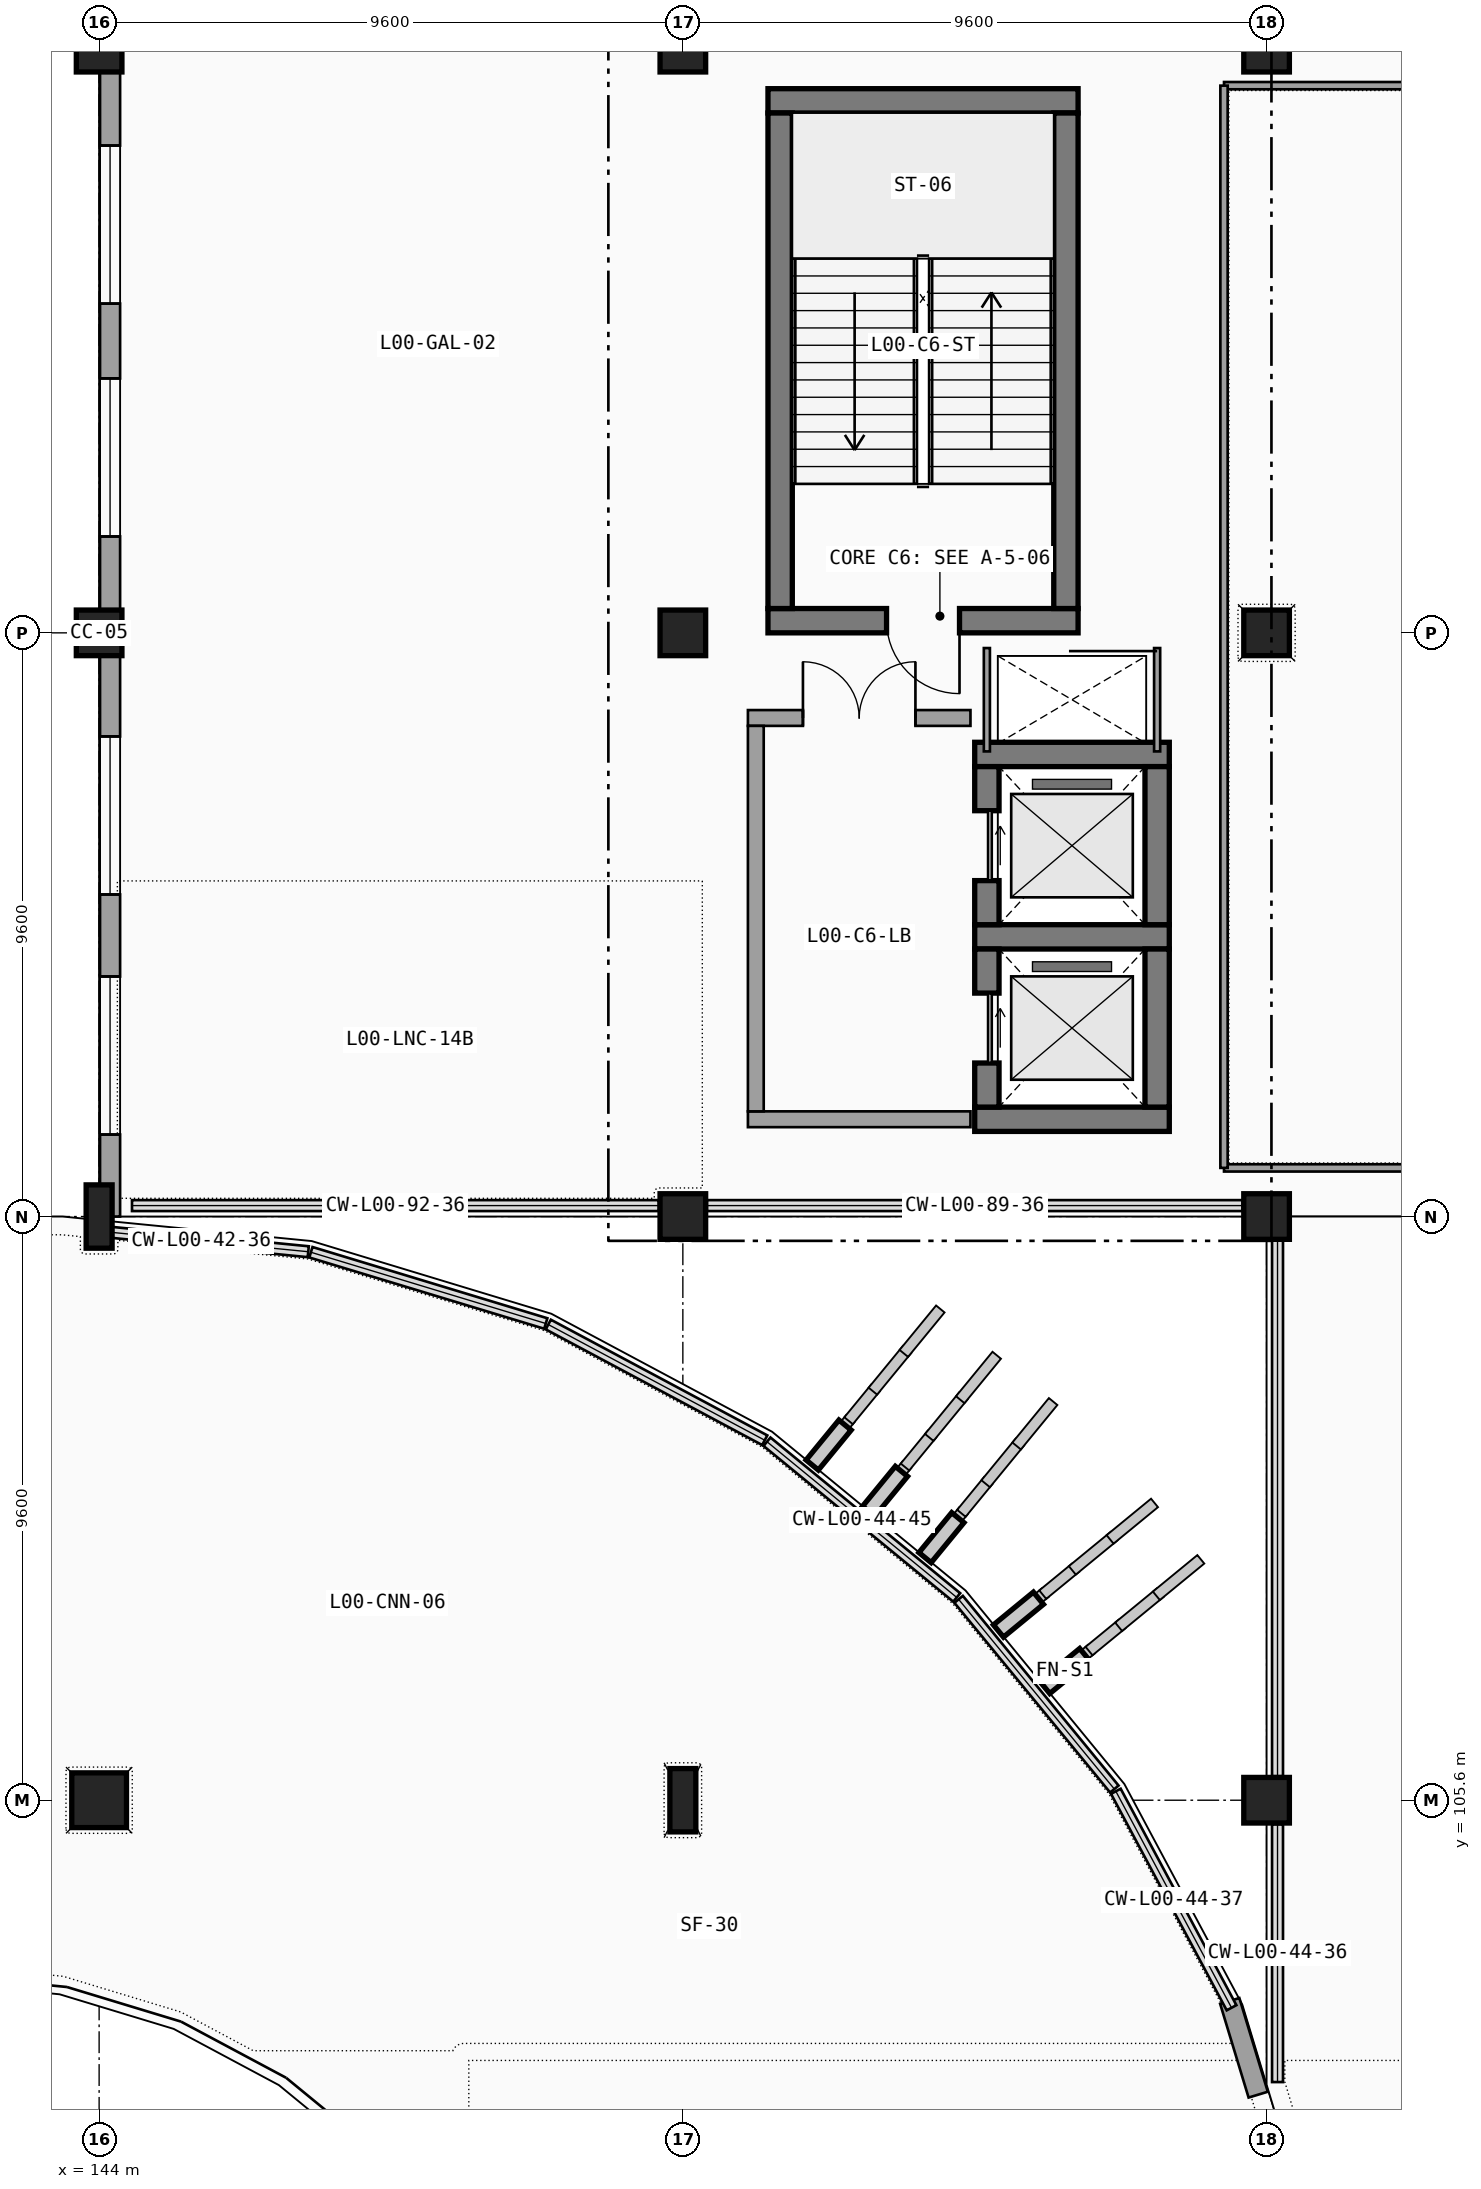
"""IFC4 building model, lengths in metres.
Left out: names, types, materials, properties, quantities, classifications, styles, units other than length and angle.
Written with IfcOpenShell. Run it as: python <this file> out.ifc"""

import sys

from ifc_helpers import new_model, si_unit, direction, frame, frame_2d, origin, origin_2d, place, context, subcontext, project, spatial, rectangle, i_section, extrude, element, fill, save


model = new_model("IFC4")
c1 = context("Model", 3, precision=1e-05, world=origin(), true_north=direction((0.0, 1.0)))
c2 = subcontext(c1, "Body", "Model", "MODEL_VIEW")
j1 = project(units=[si_unit("LENGTHUNIT", "METRE"), si_unit("PLANEANGLEUNIT", "RADIAN")], contexts=[c1])
p1 = place(None, origin())
s1 = spatial("IfcSite", under=j1, at=p1, CompositionType="ELEMENT")
p2 = place(p1, origin())
s2 = spatial("IfcBuilding", under=s1, at=p2, CompositionType="ELEMENT")
p3 = place(p2, origin())
s3 = spatial("IfcBuildingStorey", under=s2, at=p3, CompositionType="ELEMENT", Elevation=0.0)
p4 = place(p3, frame((144.0, 105.6, 0.0), z_axis=(0.0, 0.0, 1.0), x_axis=(1.0, 0.0, 0.0)))
e1 = element("IfcColumn", 1, at=p4, inside=s3, PredefinedType="COLUMN", context=c2, shape_type="SweptSolid", body=[
    extrude(rectangle(XDim=0.9, YDim=0.9, at=origin_2d()), origin(), (0.0, 0.0, 1.0), 4.8),
])
p5 = place(p3, frame((144.0, 115.2, 0.0), z_axis=(0.0, 0.0, 1.0), x_axis=(1.0, 0.0, 0.0)))
e2 = element("IfcColumn", 2, at=p5, inside=s3, PredefinedType="COLUMN", context=c2, shape_type="SweptSolid", body=[
    extrude(i_section(OverallWidth=0.427, OverallDepth=1.042, WebThickness=0.031, FlangeThickness=0.056, FilletRadius=0.031, at=origin_2d()), origin(), (0.0, 0.0, 1.0), 4.8),
])
for number, where, z_axis, x_axis in (
    (3, (144.0, 124.8, 0.0), (0.0, 0.0, 1.0), (1.0, 0.0, 0.0)),
    (4, (144.0, 134.4, 0.0), (0.0, 0.0, 1.0), (1.0, 0.0, 0.0)),
):
    element("IfcColumn", number, at=place(p3, frame(where, z_axis=z_axis, x_axis=x_axis)), inside=s3, PredefinedType="COLUMN", context=c2, shape_type="SweptSolid", body=[
        extrude(rectangle(XDim=0.75, YDim=0.75, at=origin_2d()), origin(), (0.0, 0.0, 1.0), 4.8),
    ])
p6 = place(p3, frame((153.6, 105.6, 0.0), z_axis=(0.0, 0.0, 1.0), x_axis=(1.0, 0.0, 0.0)))
e5 = element("IfcColumn", 5, at=p6, inside=s3, PredefinedType="COLUMN", context=c2, shape_type="SweptSolid", body=[
    extrude(i_section(OverallWidth=0.427, OverallDepth=1.042, WebThickness=0.031, FlangeThickness=0.056, FilletRadius=0.031, at=origin_2d()), origin(), (0.0, 0.0, 1.0), 4.8),
])
for number, where, z_axis, x_axis in (
    (6, (153.6, 115.2, 0.0), (0.0, 0.0, 1.0), (1.0, 0.0, 0.0)),
    (7, (153.6, 124.8, 0.0), (0.0, 0.0, 1.0), (1.0, 0.0, 0.0)),
    (8, (153.6, 134.4, 0.0), (0.0, 0.0, 1.0), (1.0, 0.0, 0.0)),
    (9, (163.2, 105.6, 0.0), (0.0, 0.0, 1.0), (1.0, 0.0, 0.0)),
    (10, (163.2, 115.2, 0.0), (0.0, 0.0, 1.0), (1.0, 0.0, 0.0)),
    (11, (163.2, 124.8, 0.0), (0.0, 0.0, 1.0), (1.0, 0.0, 0.0)),
    (12, (163.2, 134.4, 0.0), (0.0, 0.0, 1.0), (1.0, 0.0, 0.0)),
):
    element("IfcColumn", number, at=place(p3, frame(where, z_axis=z_axis, x_axis=x_axis)), inside=s3, PredefinedType="COLUMN", context=c2, shape_type="SweptSolid", body=[
        extrude(rectangle(XDim=0.75, YDim=0.75, at=origin_2d()), origin(), (0.0, 0.0, 1.0), 4.8),
    ])
p7 = place(p3, frame((144.18, 134.045, 0.0), z_axis=(0.0, 0.0, 1.0), x_axis=(0.0, -1.0, 0.0)))
e13 = element("IfcWall", 13, at=p7, inside=s3, PredefinedType="SOLIDWALL", context=c2, shape_type="SweptSolid", body=[
    extrude(rectangle(XDim=8.89, YDim=0.33, at=frame_2d((4.445, 0.0))), origin(), (0.0, 0.0, 1.0), 3.7),
])
p8 = place(p7, frame((3.83, 0.0, 1.0), z_axis=(0.0, 0.0, 1.0), x_axis=(-1.0, 0.0, 0.0)))
e14 = element("IfcOpeningElement", 14, at=p8, cuts=e13, PredefinedType="OPENING", context=c2, shape_type="SweptSolid", body=[
    extrude(rectangle(XDim=2.6, YDim=2.0, at=frame_2d((1.3, 1.0))), frame((0.0, 0.175, 0.0), z_axis=(0.0, -1.0, 0.0), x_axis=(1.0, 0.0, 0.0)), (0.0, 0.0, 1.0), 0.35),
])
p9 = place(p7, frame((7.66, 0.0, 1.0), z_axis=(0.0, 0.0, 1.0), x_axis=(-1.0, 0.0, 0.0)))
e15 = element("IfcOpeningElement", 15, at=p9, cuts=e13, PredefinedType="OPENING", context=c2, shape_type="SweptSolid", body=[
    extrude(rectangle(XDim=2.6, YDim=2.0, at=frame_2d((1.3, 1.0))), frame((0.0, 0.175, 0.0), z_axis=(0.0, -1.0, 0.0), x_axis=(1.0, 0.0, 0.0)), (0.0, 0.0, 1.0), 0.35),
])
p10 = place(p3, frame((144.18, 124.445, 0.0), z_axis=(0.0, 0.0, 1.0), x_axis=(0.0, -1.0, 0.0)))
e16 = element("IfcWall", 16, at=p10, inside=s3, PredefinedType="SOLIDWALL", context=c2, shape_type="SweptSolid", body=[
    extrude(rectangle(XDim=9.245, YDim=0.33, at=frame_2d((4.623, 0.0))), origin(), (0.0, 0.0, 1.0), 3.573),
])
p11 = place(p10, frame((3.948, 0.0, 1.0), z_axis=(0.0, 0.0, 1.0), x_axis=(-1.0, 0.0, 0.0)))
e17 = element("IfcOpeningElement", 17, at=p11, cuts=e16, PredefinedType="OPENING", context=c2, shape_type="SweptSolid", body=[
    extrude(rectangle(XDim=2.6, YDim=2.0, at=frame_2d((1.3, 1.0))), frame((0.0, 0.175, 0.0), z_axis=(0.0, -1.0, 0.0), x_axis=(1.0, 0.0, 0.0)), (0.0, 0.0, 1.0), 0.35),
])
p12 = place(p10, frame((7.897, 0.0, 1.0), z_axis=(0.0, 0.0, 1.0), x_axis=(-1.0, 0.0, 0.0)))
e18 = element("IfcOpeningElement", 18, at=p12, cuts=e16, PredefinedType="OPENING", context=c2, shape_type="SweptSolid", body=[
    extrude(rectangle(XDim=2.6, YDim=2.0, at=frame_2d((1.3, 1.0))), frame((0.0, 0.175, 0.0), z_axis=(0.0, -1.0, 0.0), x_axis=(1.0, 0.0, 0.0)), (0.0, 0.0, 1.0), 0.35),
])
p13 = place(p3, frame((163.062, 100.757, 0.0), z_axis=(0.0, 0.0, 1.0), x_axis=(-0.290196653702, 0.956967032964, 0.0)))
e19 = element("IfcWall", 19, at=p13, inside=s3, PredefinedType="SOLIDWALL", context=c2, shape_type="SweptSolid", body=[
    extrude(rectangle(XDim=1.611, YDim=0.33, at=frame_2d((0.806, 0.0))), origin(), (0.0, 0.0, 1.0), 3.573),
])
p14 = place(p3, frame((155.0, 125.0, 0.0), z_axis=(0.0, 0.0, 1.0), x_axis=(1.0, 0.0, 0.0)))
e20 = element("IfcWall", 20, at=p14, inside=s3, PredefinedType="SHEAR", context=c2, shape_type="SweptSolid", body=[
    extrude(rectangle(XDim=5.1, YDim=0.4, at=frame_2d((2.55, 0.0))), origin(), (0.0, 0.0, 1.0), 4.5),
])
p15 = place(p14, frame((3.15, 0.0, 0.0), z_axis=(0.0, 0.0, 1.0), x_axis=(-1.0, 0.0, 0.0)))
e21 = element("IfcOpeningElement", 21, at=p15, cuts=e20, PredefinedType="OPENING", context=c2, shape_type="SweptSolid", body=[
    extrude(rectangle(XDim=1.2, YDim=2.2, at=frame_2d((0.6, 1.1))), frame((0.0, 0.21, 0.0), z_axis=(0.0, -1.0, 0.0), x_axis=(1.0, 0.0, 0.0)), (0.0, 0.0, 1.0), 0.42),
])
p16 = place(p3, frame((160.1, 133.55, 0.0), z_axis=(0.0, 0.0, 1.0), x_axis=(-1.0, 0.0, 0.0)))
e22 = element("IfcWall", 22, at=p16, inside=s3, PredefinedType="SHEAR", context=c2, shape_type="SweptSolid", body=[
    extrude(rectangle(XDim=5.1, YDim=0.4, at=frame_2d((2.55, 0.0))), origin(), (0.0, 0.0, 1.0), 4.5),
])
for number, where, z_axis, x_axis in (
    (23, (155.2, 133.35, 0.0), (0.0, 0.0, 1.0), (0.0, -1.0, 0.0)),
    (24, (159.9, 125.2, 0.0), (0.0, 0.0, 1.0), (0.0, 1.0, 0.0)),
):
    element("IfcWall", number, at=place(p3, frame(where, z_axis=z_axis, x_axis=x_axis)), inside=s3, PredefinedType="SHEAR", context=c2, shape_type="SweptSolid", body=[
        extrude(rectangle(XDim=8.15, YDim=0.4, at=frame_2d((4.075, 0.0))), origin(), (0.0, 0.0, 1.0), 4.5),
    ])
for number, where, z_axis, x_axis in (
    (25, (158.4, 116.8, 0.0), (0.0, 0.0, 1.0), (1.0, 0.0, 0.0)),
    (26, (161.6, 119.8, 0.0), (0.0, 0.0, 1.0), (-1.0, 0.0, 0.0)),
):
    element("IfcWall", number, at=place(p3, frame(where, z_axis=z_axis, x_axis=x_axis)), inside=s3, PredefinedType="SHEAR", context=c2, shape_type="SweptSolid", body=[
        extrude(rectangle(XDim=3.2, YDim=0.4, at=frame_2d((1.6, 0.0))), origin(), (0.0, 0.0, 1.0), 4.5),
    ])
p17 = place(p3, frame((158.6, 119.6, 0.0), z_axis=(0.0, 0.0, 1.0), x_axis=(0.0, -1.0, 0.0)))
e27 = element("IfcWall", 27, at=p17, inside=s3, PredefinedType="SHEAR", context=c2, shape_type="SweptSolid", body=[
    extrude(rectangle(XDim=2.6, YDim=0.4, at=frame_2d((1.3, 0.0))), origin(), (0.0, 0.0, 1.0), 4.5),
])
p18 = place(p17, frame((0.725, 0.0, 0.0), z_axis=(0.0, 0.0, 1.0), x_axis=(1.0, 0.0, 0.0)))
e28 = element("IfcOpeningElement", 28, at=p18, cuts=e27, PredefinedType="OPENING", context=c2, shape_type="SweptSolid", body=[
    extrude(rectangle(XDim=1.15, YDim=2.2, at=frame_2d((0.575, 1.1))), frame((0.0, 0.21, 0.0), z_axis=(0.0, -1.0, 0.0), x_axis=(1.0, 0.0, 0.0)), (0.0, 0.0, 1.0), 0.42),
])
p19 = place(p3, frame((161.4, 117.0, 0.0), z_axis=(0.0, 0.0, 1.0), x_axis=(0.0, 1.0, 0.0)))
e29 = element("IfcWall", 29, at=p19, inside=s3, PredefinedType="SHEAR", context=c2, shape_type="SweptSolid", body=[
    extrude(rectangle(XDim=2.6, YDim=0.4, at=frame_2d((1.3, 0.0))), origin(), (0.0, 0.0, 1.0), 4.5),
])
p20 = place(p3, frame((161.6, 122.8, 0.0), z_axis=(0.0, 0.0, 1.0), x_axis=(-1.0, 0.0, 0.0)))
e30 = element("IfcWall", 30, at=p20, inside=s3, PredefinedType="SHEAR", context=c2, shape_type="SweptSolid", body=[
    extrude(rectangle(XDim=3.2, YDim=0.4, at=frame_2d((1.6, 0.0))), origin(), (0.0, 0.0, 1.0), 4.5),
])
p21 = place(p3, frame((158.6, 122.6, 0.0), z_axis=(0.0, 0.0, 1.0), x_axis=(0.0, -1.0, 0.0)))
e31 = element("IfcWall", 31, at=p21, inside=s3, PredefinedType="SHEAR", context=c2, shape_type="SweptSolid", body=[
    extrude(rectangle(XDim=2.6, YDim=0.4, at=frame_2d((1.3, 0.0))), origin(), (0.0, 0.0, 1.0), 4.5),
])
p22 = place(p21, frame((0.725, 0.0, 0.0), z_axis=(0.0, 0.0, 1.0), x_axis=(1.0, 0.0, 0.0)))
e32 = element("IfcOpeningElement", 32, at=p22, cuts=e31, PredefinedType="OPENING", context=c2, shape_type="SweptSolid", body=[
    extrude(rectangle(XDim=1.15, YDim=2.2, at=frame_2d((0.575, 1.1))), frame((0.0, 0.21, 0.0), z_axis=(0.0, -1.0, 0.0), x_axis=(1.0, 0.0, 0.0)), (0.0, 0.0, 1.0), 0.42),
])
p23 = place(p3, frame((161.4, 120.0, 0.0), z_axis=(0.0, 0.0, 1.0), x_axis=(0.0, 1.0, 0.0)))
e33 = element("IfcWall", 33, at=p23, inside=s3, PredefinedType="SHEAR", context=c2, shape_type="SweptSolid", body=[
    extrude(rectangle(XDim=2.6, YDim=0.4, at=frame_2d((1.3, 0.0))), origin(), (0.0, 0.0, 1.0), 4.5),
])
for number, where, z_axis, x_axis in (
    (34, (158.6, 124.55, 0.0), (0.0, 0.0, 1.0), (0.0, -1.0, 0.0)),
    (35, (161.4, 122.85, 0.0), (0.0, 0.0, 1.0), (0.0, 1.0, 0.0)),
):
    element("IfcWall", number, at=place(p3, frame(where, z_axis=z_axis, x_axis=x_axis)), inside=s3, PredefinedType="PARTITIONING", context=c2, shape_type="SweptSolid", body=[
        extrude(rectangle(XDim=1.7, YDim=0.1, at=frame_2d((0.85, 0.0))), origin(), (0.0, 0.0, 1.0), 4.5),
    ])
p24 = place(p3, frame((154.67, 116.8, 0.0), z_axis=(0.0, 0.0, 1.0), x_axis=(1.0, 0.0, 0.0)))
e36 = element("IfcWall", 36, at=p24, inside=s3, PredefinedType="SOLIDWALL", context=c2, shape_type="SweptSolid", body=[
    extrude(rectangle(XDim=3.66, YDim=0.26, at=frame_2d((1.83, 0.0))), origin(), (0.0, 0.0, 1.0), 4.5),
])
p25 = place(p3, frame((158.33, 123.4, 0.0), z_axis=(0.0, 0.0, 1.0), x_axis=(-1.0, 0.0, 0.0)))
e37 = element("IfcWall", 37, at=p25, inside=s3, PredefinedType="SOLIDWALL", context=c2, shape_type="SweptSolid", body=[
    extrude(rectangle(XDim=3.66, YDim=0.26, at=frame_2d((1.83, 0.0))), origin(), (0.0, 0.0, 1.0), 4.5),
])
p26 = place(p25, frame((2.755, 0.0, 0.0), z_axis=(0.0, 0.0, 1.0), x_axis=(-1.0, 0.0, 0.0)))
e38 = element("IfcOpeningElement", 38, at=p26, cuts=e37, PredefinedType="OPENING", context=c2, shape_type="SweptSolid", body=[
    extrude(rectangle(XDim=1.85, YDim=2.25, at=frame_2d((0.925, 1.125))), frame((0.0, 0.14, 0.0), z_axis=(0.0, -1.0, 0.0), x_axis=(1.0, 0.0, 0.0)), (0.0, 0.0, 1.0), 0.28),
])
p27 = place(p3, frame((154.8, 123.27, 0.0), z_axis=(0.0, 0.0, 1.0), x_axis=(0.0, -1.0, 0.0)))
e39 = element("IfcWall", 39, at=p27, inside=s3, PredefinedType="SOLIDWALL", context=c2, shape_type="SweptSolid", body=[
    extrude(rectangle(XDim=6.34, YDim=0.26, at=frame_2d((3.17, 0.0))), origin(), (0.0, 0.0, 1.0), 4.5),
])
p28 = place(p3, frame((162.5, 133.8, 0.0), z_axis=(0.0, 0.0, 1.0), x_axis=(1.0, 0.0, 0.0)))
e40 = element("IfcWall", 40, at=p28, inside=s3, PredefinedType="PARTITIONING", context=c2, shape_type="SweptSolid", body=[
    extrude(rectangle(XDim=29.0, YDim=0.12, at=frame_2d((14.5, 0.0))), origin(), (0.0, 0.0, 1.0), 3.7),
])
p29 = place(p3, frame((191.5, 116.0, 0.0), z_axis=(0.0, 0.0, 1.0), x_axis=(-1.0, 0.0, 0.0)))
e41 = element("IfcWall", 41, at=p29, inside=s3, PredefinedType="PARTITIONING", context=c2, shape_type="SweptSolid", body=[
    extrude(rectangle(XDim=29.0, YDim=0.12, at=frame_2d((14.5, 0.0))), origin(), (0.0, 0.0, 1.0), 3.573),
])
p30 = place(p29, frame((3.825, 0.0, 0.0), z_axis=(0.0, 0.0, 1.0), x_axis=(1.0, 0.0, 0.0)))
e42 = element("IfcOpeningElement", 42, at=p30, cuts=e41, PredefinedType="OPENING", context=c2, shape_type="SweptSolid", body=[
    extrude(rectangle(XDim=0.95, YDim=2.15, at=frame_2d((0.475, 1.075))), frame((0.0, 0.07, 0.0), z_axis=(0.0, -1.0, 0.0), x_axis=(1.0, 0.0, 0.0)), (0.0, 0.0, 1.0), 0.14),
])
p31 = place(p3, frame((162.5, 116.0, 0.0), z_axis=(0.0, 0.0, 1.0), x_axis=(0.0, 1.0, 0.0)))
e43 = element("IfcWall", 43, at=p31, inside=s3, PredefinedType="PARTITIONING", context=c2, shape_type="SweptSolid", body=[
    extrude(rectangle(XDim=17.8, YDim=0.12, at=frame_2d((8.9, 0.0))), origin(), (0.0, 0.0, 1.0), 3.664),
])
p32 = place(p8, origin())
e44 = element("IfcWindow", 44, at=p32, inside=s3, PartitioningType="SINGLE_PANEL", PredefinedType="WINDOW", context=c2, shape_type="SweptSolid", body=[
    extrude(rectangle(XDim=2.6, YDim=2.0, at=frame_2d((1.3, 1.0))), frame((0.0, 0.03, 0.0), z_axis=(0.0, -1.0, 0.0), x_axis=(1.0, 0.0, 0.0)), (0.0, 0.0, 1.0), 0.06),
])
fill(e14, e44)
p33 = place(p9, origin())
e45 = element("IfcWindow", 45, at=p33, inside=s3, PartitioningType="SINGLE_PANEL", PredefinedType="WINDOW", context=c2, shape_type="SweptSolid", body=[
    extrude(rectangle(XDim=2.6, YDim=2.0, at=frame_2d((1.3, 1.0))), frame((0.0, 0.03, 0.0), z_axis=(0.0, -1.0, 0.0), x_axis=(1.0, 0.0, 0.0)), (0.0, 0.0, 1.0), 0.06),
])
fill(e15, e45)
p34 = place(p11, origin())
e46 = element("IfcWindow", 46, at=p34, inside=s3, PartitioningType="SINGLE_PANEL", PredefinedType="WINDOW", context=c2, shape_type="SweptSolid", body=[
    extrude(rectangle(XDim=2.6, YDim=2.0, at=frame_2d((1.3, 1.0))), frame((0.0, 0.03, 0.0), z_axis=(0.0, -1.0, 0.0), x_axis=(1.0, 0.0, 0.0)), (0.0, 0.0, 1.0), 0.06),
])
fill(e17, e46)
p35 = place(p12, origin())
e47 = element("IfcWindow", 47, at=p35, inside=s3, PartitioningType="SINGLE_PANEL", PredefinedType="WINDOW", context=c2, shape_type="SweptSolid", body=[
    extrude(rectangle(XDim=2.6, YDim=2.0, at=frame_2d((1.3, 1.0))), frame((0.0, 0.03, 0.0), z_axis=(0.0, -1.0, 0.0), x_axis=(1.0, 0.0, 0.0)), (0.0, 0.0, 1.0), 0.06),
])
fill(e18, e47)
p36 = place(p15, origin())
e48 = element("IfcDoor", 48, at=p36, inside=s3, OperationType="SINGLE_SWING_LEFT", PredefinedType="DOOR", context=c2, shape_type="SweptSolid", body=[
    extrude(rectangle(XDim=1.2, YDim=2.2, at=frame_2d((0.6, 1.1))), frame((0.0, 0.025, 0.0), z_axis=(0.0, -1.0, 0.0), x_axis=(1.0, 0.0, 0.0)), (0.0, 0.0, 1.0), 0.05),
])
fill(e21, e48)
p37 = place(p18, origin())
e49 = element("IfcDoor", 49, at=p37, inside=s3, OperationType="SLIDING_TO_LEFT", PredefinedType="DOOR", context=c2, shape_type="SweptSolid", body=[
    extrude(rectangle(XDim=1.15, YDim=2.2, at=frame_2d((0.575, 1.1))), frame((0.0, 0.025, 0.0), z_axis=(0.0, -1.0, 0.0), x_axis=(1.0, 0.0, 0.0)), (0.0, 0.0, 1.0), 0.05),
])
fill(e28, e49)
p38 = place(p22, origin())
e50 = element("IfcDoor", 50, at=p38, inside=s3, OperationType="SLIDING_TO_LEFT", PredefinedType="DOOR", context=c2, shape_type="SweptSolid", body=[
    extrude(rectangle(XDim=1.15, YDim=2.2, at=frame_2d((0.575, 1.1))), frame((0.0, 0.025, 0.0), z_axis=(0.0, -1.0, 0.0), x_axis=(1.0, 0.0, 0.0)), (0.0, 0.0, 1.0), 0.05),
])
fill(e32, e50)
p39 = place(p26, origin())
e51 = element("IfcDoor", 51, at=p39, inside=s3, OperationType="DOUBLE_DOOR_SINGLE_SWING", PredefinedType="DOOR", context=c2, shape_type="SweptSolid", body=[
    extrude(rectangle(XDim=1.85, YDim=2.25, at=frame_2d((0.925, 1.125))), frame((0.0, 0.025, 0.0), z_axis=(0.0, -1.0, 0.0), x_axis=(1.0, 0.0, 0.0)), (0.0, 0.0, 1.0), 0.05),
])
fill(e38, e51)
save(model, sys.argv[1])
